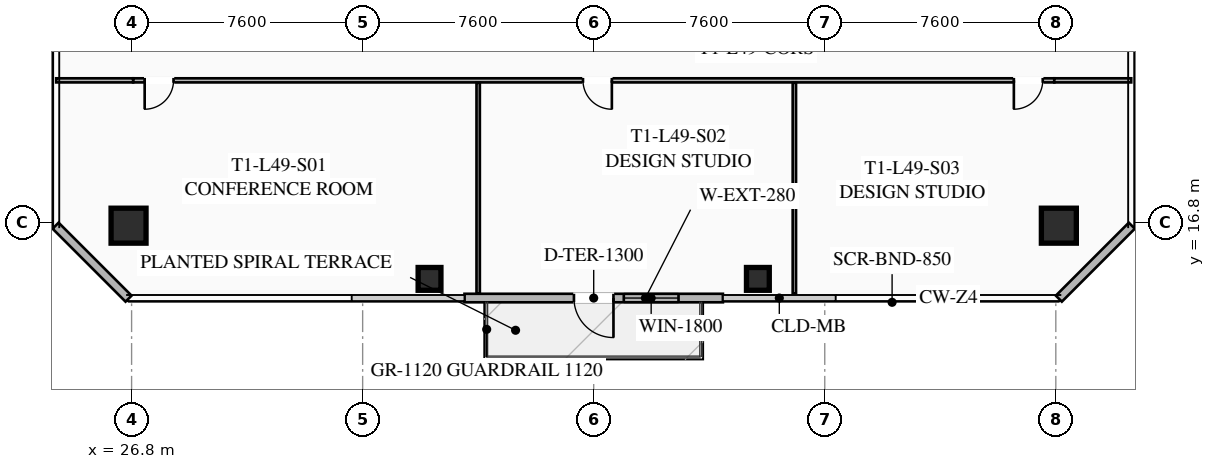
"""IFC4 building model, lengths in metres.
Left out: names, types, materials, properties, quantities, classifications, styles, units other than length and angle.
Written with IfcOpenShell. Run it as: python <this file> out.ifc"""

import sys

from ifc_helpers import new_model, si_unit, direction, frame, frame_2d, origin, origin_2d, place, context, subcontext, project, spatial, rectangle, hollow_rectangle, extrude, element, fill, save


model = new_model("IFC4")
c1 = context("Model", 3, precision=1e-05, world=origin(), true_north=direction((0.0, 1.0)))
c2 = subcontext(c1, "Body", "Model", "MODEL_VIEW")
j1 = project(units=[si_unit("LENGTHUNIT", "METRE"), si_unit("PLANEANGLEUNIT", "RADIAN")], contexts=[c1])
p1 = place(None, origin())
s1 = spatial("IfcSite", under=j1, at=p1, CompositionType="ELEMENT")
p2 = place(p1, origin())
s2 = spatial("IfcBuilding", under=s1, at=p2, CompositionType="ELEMENT")
p3 = place(p2, frame((0.0, 0.0, 181.85)))
s3 = spatial("IfcBuildingStorey", under=s2, at=p3, CompositionType="ELEMENT", Elevation=181.85)
for number, where, z_axis, x_axis in (
    (1, (26.7, 16.7, 0.0), (0.0, 0.0, 1.0), (1.0, 0.0, 0.0)),
    (2, (57.3, 16.7, 0.0), (0.0, 0.0, 1.0), (1.0, 0.0, 0.0)),
):
    element("IfcColumn", number, at=place(p3, frame(where, z_axis=z_axis, x_axis=x_axis)), inside=s3, PredefinedType="COLUMN", context=c2, shape_type="SweptSolid", body=[
        extrude(hollow_rectangle(XDim=1.15, YDim=1.15, WallThickness=0.045, at=origin_2d()), origin(), (0.0, 0.0, 1.0), 3.37),
    ])
for number, where, z_axis, x_axis in (
    (3, (36.6, 14.95, 0.0), (0.0, 0.0, 1.0), (1.0, 0.0, 0.0)),
    (4, (47.4, 14.95, 0.0), (0.0, 0.0, 1.0), (1.0, 0.0, 0.0)),
):
    element("IfcColumn", number, at=place(p3, frame(where, z_axis=z_axis, x_axis=x_axis)), inside=s3, PredefinedType="COLUMN", context=c2, shape_type="SweptSolid", body=[
        extrude(hollow_rectangle(XDim=0.75, YDim=0.75, WallThickness=0.032, at=origin_2d()), origin(), (0.0, 0.0, 1.0), 3.37),
    ])
p4 = place(p3, frame((46.25, 14.32, 0.0), z_axis=(0.0, 0.0, 1.0), x_axis=(-1.0, 0.0, 0.0)))
e5 = element("IfcWall", 5, at=p4, inside=s3, PredefinedType="SOLIDWALL", context=c2, shape_type="SweptSolid", body=[
    extrude(rectangle(XDim=8.5, YDim=0.28, at=frame_2d((4.25, 0.0))), origin(), (0.0, 0.0, 1.0), 3.37),
])
p5 = place(p4, frame((3.6, 0.0, 0.0)))
e6 = element("IfcOpeningElement", 6, at=p5, cuts=e5, PredefinedType="OPENING", context=c2, shape_type="SweptSolid", body=[
    extrude(rectangle(XDim=1.3, YDim=2.15, at=frame_2d((0.65, 1.075))), frame((0.0, 0.15, 0.0), z_axis=(0.0, -1.0, 0.0), x_axis=(1.0, 0.0, 0.0)), (0.0, 0.0, 1.0), 0.3),
])
p6 = place(p4, frame((1.46, 0.0, 0.85)))
e7 = element("IfcOpeningElement", 7, at=p6, cuts=e5, PredefinedType="OPENING", context=c2, shape_type="SweptSolid", body=[
    extrude(rectangle(XDim=1.8, YDim=1.92, at=frame_2d((0.9, 0.96))), frame((0.0, 0.15, 0.0), z_axis=(0.0, -1.0, 0.0), x_axis=(1.0, 0.0, 0.0)), (0.0, 0.0, 1.0), 0.3),
])
for number, where, z_axis, x_axis in (
    (8, (26.7, 14.3, 0.0), (0.0, 0.0, 1.0), (-0.707, 0.707, 0.0)),
    (9, (59.7, 16.7, 0.0), (0.0, 0.0, 1.0), (-0.707, -0.707, 0.0)),
):
    element("IfcWall", number, at=place(p3, frame(where, z_axis=z_axis, x_axis=x_axis)), inside=s3, PredefinedType="SOLIDWALL", context=c2, shape_type="SweptSolid", body=[
        extrude(rectangle(XDim=3.394, YDim=0.28, at=frame_2d((1.697, 0.0))), origin(), (0.0, 0.0, 1.0), 3.37),
    ])
p7 = place(p3, frame((57.15, 21.48, 0.0), z_axis=(0.0, 0.0, 1.0), x_axis=(-1.0, 0.0, 0.0)))
e10 = element("IfcWall", 10, at=p7, inside=s3, PredefinedType="PARTITIONING", context=c2, shape_type="SweptSolid", body=[
    extrude(rectangle(XDim=30.3, YDim=0.135, at=frame_2d((15.15, 0.0))), origin(), (0.0, 0.0, 1.0), 2.723),
])
p8 = place(p7, frame((28.97, 0.0, 0.0)))
e11 = element("IfcOpeningElement", 11, at=p8, cuts=e10, PredefinedType="OPENING", context=c2, shape_type="SweptSolid", body=[
    extrude(rectangle(XDim=0.95, YDim=2.05, at=frame_2d((0.475, 1.025))), frame((0.0, 0.077, 0.0), z_axis=(0.0, -1.0, 0.0), x_axis=(1.0, 0.0, 0.0)), (0.0, 0.0, 1.0), 0.155),
])
p9 = place(p7, frame((14.553, 0.0, 0.0)))
e12 = element("IfcOpeningElement", 12, at=p9, cuts=e10, PredefinedType="OPENING", context=c2, shape_type="SweptSolid", body=[
    extrude(rectangle(XDim=0.95, YDim=2.05, at=frame_2d((0.475, 1.025))), frame((0.0, 0.077, 0.0), z_axis=(0.0, -1.0, 0.0), x_axis=(1.0, 0.0, 0.0)), (0.0, 0.0, 1.0), 0.155),
])
p10 = place(p7, frame((0.38, 0.0, 0.0)))
e13 = element("IfcOpeningElement", 13, at=p10, cuts=e10, PredefinedType="OPENING", context=c2, shape_type="SweptSolid", body=[
    extrude(rectangle(XDim=0.95, YDim=2.05, at=frame_2d((0.475, 1.025))), frame((0.0, 0.077, 0.0), z_axis=(0.0, -1.0, 0.0), x_axis=(1.0, 0.0, 0.0)), (0.0, 0.0, 1.0), 0.155),
])
for number, where, z_axis, x_axis in (
    (14, (24.32, 21.48, 0.0), (0.0, 0.0, 1.0), (1.0, 0.0, 0.0)),
    (15, (57.15, 21.48, 0.0), (0.0, 0.0, 1.0), (1.0, 0.0, 0.0)),
):
    element("IfcWall", number, at=place(p3, frame(where, z_axis=z_axis, x_axis=x_axis)), inside=s3, PredefinedType="PARTITIONING", context=c2, shape_type="SweptSolid", body=[
        extrude(rectangle(XDim=2.53, YDim=0.135, at=frame_2d((1.265, 0.0))), origin(), (0.0, 0.0, 1.0), 2.723),
    ])
for number, where, z_axis, x_axis in (
    (16, (38.2, 14.47, 0.0), (0.0, 0.0, 1.0), (0.0, 1.0, 0.0)),
    (17, (48.6, 14.47, 0.0), (0.0, 0.0, 1.0), (0.0, 1.0, 0.0)),
):
    element("IfcWall", number, at=place(p3, frame(where, z_axis=z_axis, x_axis=x_axis)), inside=s3, PredefinedType="PARTITIONING", context=c2, shape_type="SweptSolid", body=[
        extrude(rectangle(XDim=6.93, YDim=0.11, at=frame_2d((3.465, 0.0))), origin(), (0.0, 0.0, 1.0), 2.723),
    ])
p11 = place(p5, origin())
e18 = element("IfcDoor", 18, at=p11, inside=s3, OperationType="SINGLE_SWING_LEFT", PredefinedType="DOOR", context=c2, shape_type="SweptSolid", body=[
    extrude(rectangle(XDim=1.3, YDim=2.15, at=frame_2d((0.65, 1.075))), frame((0.0, 0.025, 0.0), z_axis=(0.0, -1.0, 0.0), x_axis=(1.0, 0.0, 0.0)), (0.0, 0.0, 1.0), 0.05),
])
fill(e6, e18)
p12 = place(p6, origin())
e19 = element("IfcWindow", 19, at=p12, inside=s3, PartitioningType="SINGLE_PANEL", PredefinedType="WINDOW", context=c2, shape_type="SweptSolid", body=[
    extrude(rectangle(XDim=1.8, YDim=1.92, at=frame_2d((0.9, 0.96))), frame((0.0, 0.03, 0.0), z_axis=(0.0, -1.0, 0.0), x_axis=(1.0, 0.0, 0.0)), (0.0, 0.0, 1.0), 0.06),
])
fill(e7, e19)
p13 = place(p8, origin())
e20 = element("IfcDoor", 20, at=p13, inside=s3, OperationType="SINGLE_SWING_RIGHT", PredefinedType="DOOR", context=c2, shape_type="SweptSolid", body=[
    extrude(rectangle(XDim=0.95, YDim=2.05, at=frame_2d((0.475, 1.025))), frame((0.0, 0.025, 0.0), z_axis=(0.0, -1.0, 0.0), x_axis=(1.0, 0.0, 0.0)), (0.0, 0.0, 1.0), 0.05),
])
fill(e11, e20)
p14 = place(p9, origin())
e21 = element("IfcDoor", 21, at=p14, inside=s3, OperationType="SINGLE_SWING_LEFT", PredefinedType="DOOR", context=c2, shape_type="SweptSolid", body=[
    extrude(rectangle(XDim=0.95, YDim=2.05, at=frame_2d((0.475, 1.025))), frame((0.0, 0.025, 0.0), z_axis=(0.0, -1.0, 0.0), x_axis=(1.0, 0.0, 0.0)), (0.0, 0.0, 1.0), 0.05),
])
fill(e12, e21)
p15 = place(p10, origin())
e22 = element("IfcDoor", 22, at=p15, inside=s3, OperationType="SINGLE_SWING_RIGHT", PredefinedType="DOOR", context=c2, shape_type="SweptSolid", body=[
    extrude(rectangle(XDim=0.95, YDim=2.05, at=frame_2d((0.475, 1.025))), frame((0.0, 0.025, 0.0), z_axis=(0.0, -1.0, 0.0), x_axis=(1.0, 0.0, 0.0)), (0.0, 0.0, 1.0), 0.05),
])
fill(e13, e22)
save(model, sys.argv[1])
